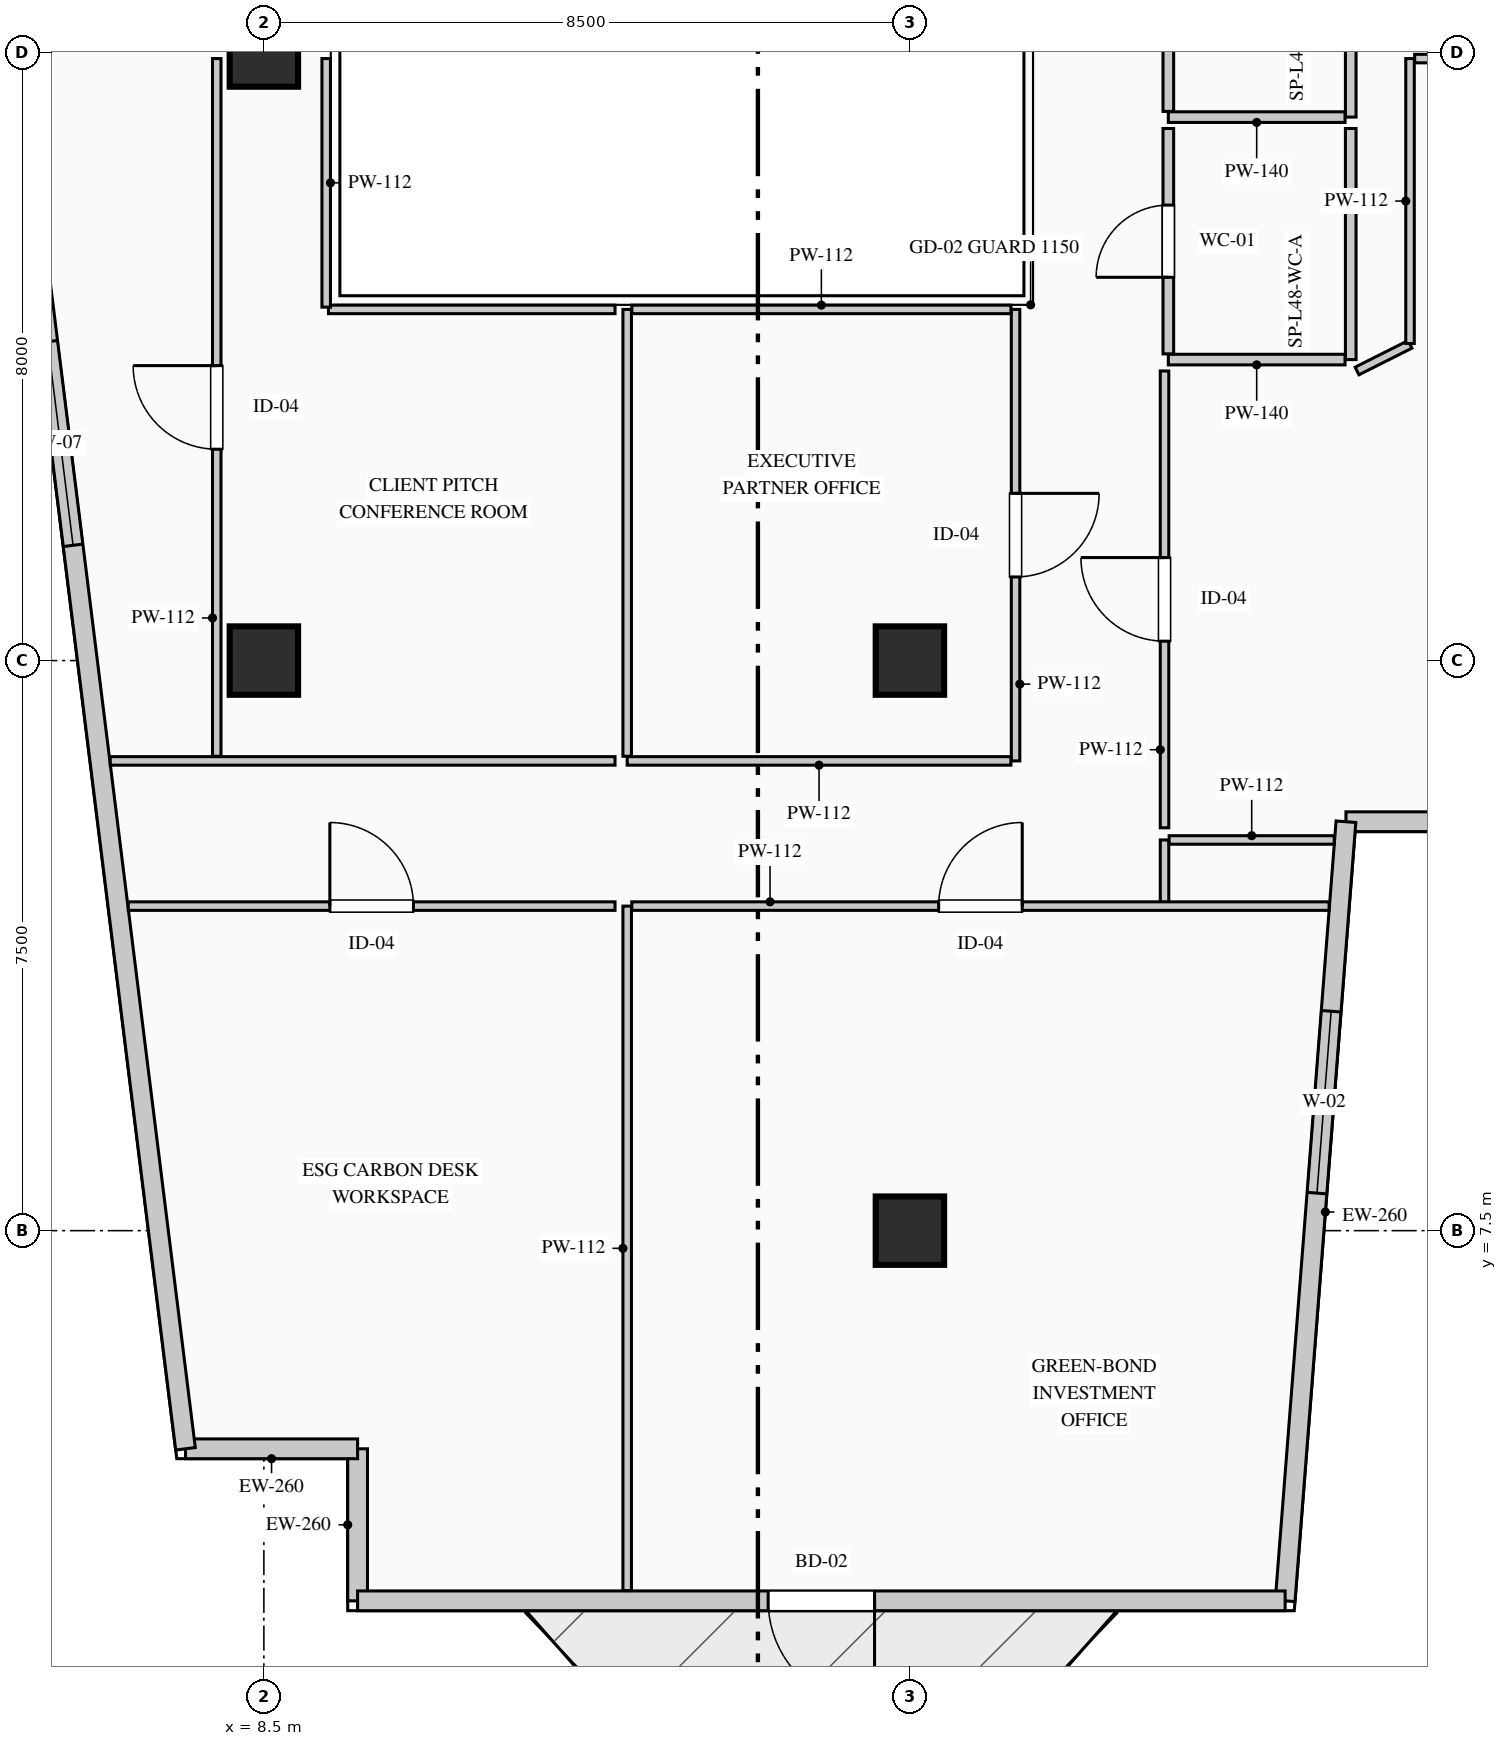
"""IFC4 building model, lengths in metres.
Left out: names, types, materials, properties, quantities, classifications, styles, units other than length and angle.
Written with IfcOpenShell. Run it as: python <this file> out.ifc"""

import sys

from ifc_helpers import new_model, si_unit, direction, frame, frame_2d, origin, origin_2d, place, context, subcontext, project, spatial, rectangle, extrude, element, fill, save


model = new_model("IFC4")
c1 = context("Model", 3, precision=1e-05, world=origin(), true_north=direction((0.0, 1.0)))
c2 = subcontext(c1, "Body", "Model", "MODEL_VIEW")
j1 = project(units=[si_unit("LENGTHUNIT", "METRE"), si_unit("PLANEANGLEUNIT", "RADIAN")], contexts=[c1])
p1 = place(None, origin())
s1 = spatial("IfcSite", under=j1, at=p1, CompositionType="ELEMENT")
p2 = place(p1, origin())
s2 = spatial("IfcBuilding", under=s1, at=p2, CompositionType="ELEMENT")
p3 = place(p2, frame((0.0, 0.0, 203.5)))
s3 = spatial("IfcBuildingStorey", under=s2, at=p3, CompositionType="ELEMENT", Elevation=203.5)
for number, where, z_axis, x_axis in (
    (1, (8.5, 15.0, 0.0), (0.0, 0.0, 1.0), (1.0, 0.0, 0.0)),
    (2, (8.5, 23.0, 0.0), (0.0, 0.0, 1.0), (1.0, 0.0, 0.0)),
    (3, (17.0, 7.5, 0.0), (0.0, 0.0, 1.0), (1.0, 0.0, 0.0)),
    (4, (17.0, 15.0, 0.0), (0.0, 0.0, 1.0), (1.0, 0.0, 0.0)),
):
    element("IfcColumn", number, at=place(p3, frame(where, z_axis=z_axis, x_axis=x_axis)), inside=s3, PredefinedType="COLUMN", context=c2, shape_type="SweptSolid", body=[
        extrude(rectangle(XDim=0.9, YDim=0.9, at=origin_2d()), origin(), (0.0, 0.0, 1.0), 3.95),
    ])
p4 = place(p3, frame((9.733, 2.63, 0.0), z_axis=(0.0, 0.0, 1.0), x_axis=(0.0, 1.0, 0.0)))
e5 = element("IfcWall", 5, at=p4, inside=s3, PredefinedType="STANDARD", context=c2, shape_type="SweptSolid", body=[
    extrude(rectangle(XDim=2.0, YDim=0.26, at=frame_2d((1.0, 0.0))), origin(), (0.0, 0.0, 1.0), 3.7),
])
p5 = place(p3, frame((9.733, 4.63, 0.0), z_axis=(0.0, 0.0, 1.0), x_axis=(-1.0, 0.0, 0.0)))
e6 = element("IfcWall", 6, at=p5, inside=s3, PredefinedType="STANDARD", context=c2, shape_type="SweptSolid", body=[
    extrude(rectangle(XDim=2.264, YDim=0.26, at=frame_2d((1.132, 0.0))), origin(), (0.0, 0.0, 1.0), 3.7),
])
p6 = place(p3, frame((7.469, 4.63, 0.0), z_axis=(0.0, 0.0, 1.0), x_axis=(-0.123515300309, 0.992342667928, 0.0)))
e7 = element("IfcWall", 7, at=p6, inside=s3, PredefinedType="STANDARD", context=c2, shape_type="SweptSolid", body=[
    extrude(rectangle(XDim=37.024, YDim=0.26, at=frame_2d((18.512, 0.0))), origin(), (0.0, 0.0, 1.0), 3.7),
])
p7 = place(p6, frame((11.978, 0.0, 0.9)))
e8 = element("IfcOpeningElement", 8, at=p7, cuts=e7, PredefinedType="OPENING", context=c2, shape_type="SweptSolid", body=[
    extrude(rectangle(XDim=2.7, YDim=2.1, at=frame_2d((1.35, 1.05))), frame((0.0, 0.14, 0.0), z_axis=(0.0, -1.0, 0.0), x_axis=(1.0, 0.0, 0.0)), (0.0, 0.0, 1.0), 0.28),
])
p8 = place(p3, frame((29.59, 12.88, 0.0), z_axis=(0.0, 0.0, 1.0), x_axis=(-1.0, 0.0, 0.0)))
e9 = element("IfcWall", 9, at=p8, inside=s3, PredefinedType="STANDARD", context=c2, shape_type="SweptSolid", body=[
    extrude(rectangle(XDim=6.853, YDim=0.26, at=frame_2d((3.426, 0.0))), origin(), (0.0, 0.0, 1.0), 3.7),
])
p9 = place(p8, frame((1.267, 0.0, 0.9)))
e10 = element("IfcOpeningElement", 10, at=p9, cuts=e9, PredefinedType="OPENING", context=c2, shape_type="SweptSolid", body=[
    extrude(rectangle(XDim=2.4, YDim=2.1, at=frame_2d((1.2, 1.05))), frame((0.0, 0.14, 0.0), z_axis=(0.0, -1.0, 0.0), x_axis=(1.0, 0.0, 0.0)), (0.0, 0.0, 1.0), 0.28),
])
p10 = place(p3, frame((22.737, 12.88, 0.0), z_axis=(0.0, 0.0, 1.0), x_axis=(-0.077816860153, -0.996967670627, 0.0)))
e11 = element("IfcWall", 11, at=p10, inside=s3, PredefinedType="STANDARD", context=c2, shape_type="SweptSolid", body=[
    extrude(rectangle(XDim=10.281, YDim=0.26, at=frame_2d((5.141, 0.0))), origin(), (0.0, 0.0, 1.0), 3.7),
])
p11 = place(p10, frame((2.501, 0.0, 0.9)))
e12 = element("IfcOpeningElement", 12, at=p11, cuts=e11, PredefinedType="OPENING", context=c2, shape_type="SweptSolid", body=[
    extrude(rectangle(XDim=2.4, YDim=2.1, at=frame_2d((1.2, 1.05))), frame((0.0, 0.14, 0.0), z_axis=(0.0, -1.0, 0.0), x_axis=(1.0, 0.0, 0.0)), (0.0, 0.0, 1.0), 0.28),
])
p12 = place(p3, frame((21.937, 2.63, 0.0), z_axis=(0.0, 0.0, 1.0), x_axis=(-1.0, 0.0, 0.0)))
e13 = element("IfcWall", 13, at=p12, inside=s3, PredefinedType="STANDARD", context=c2, shape_type="SweptSolid", body=[
    extrude(rectangle(XDim=12.204, YDim=0.26, at=frame_2d((6.102, 0.0))), origin(), (0.0, 0.0, 1.0), 3.7),
])
p13 = place(p12, frame((5.402, 0.0, 0.0)))
e14 = element("IfcOpeningElement", 14, at=p13, cuts=e13, PredefinedType="OPENING", context=c2, shape_type="SweptSolid", body=[
    extrude(rectangle(XDim=1.4, YDim=2.2, at=frame_2d((0.7, 1.1))), frame((0.0, 0.14, 0.0), z_axis=(0.0, -1.0, 0.0), x_axis=(1.0, 0.0, 0.0)), (0.0, 0.0, 1.0), 0.28),
])
p14 = place(p3, frame((22.8, 25.15, 0.0), z_axis=(0.0, 0.0, 1.0), x_axis=(0.0, -1.0, 0.0)))
e15 = element("IfcWall", 15, at=p14, inside=s3, PredefinedType="PARTITIONING", context=c2, shape_type="SweptSolid", body=[
    extrude(rectangle(XDim=3.0, YDim=0.14, at=frame_2d((1.5, 0.0))), origin(), (0.0, 0.0, 1.0), 3.285),
])
p15 = place(p3, frame((22.725, 22.15, 0.0), z_axis=(0.0, 0.0, 1.0), x_axis=(-1.0, 0.0, 0.0)))
e16 = element("IfcWall", 16, at=p15, inside=s3, PredefinedType="PARTITIONING", context=c2, shape_type="SweptSolid", body=[
    extrude(rectangle(XDim=2.325, YDim=0.14, at=frame_2d((1.163, 0.0))), origin(), (0.0, 0.0, 1.0), 3.7),
])
p16 = place(p3, frame((20.4, 22.225, 0.0), z_axis=(0.0, 0.0, 1.0), x_axis=(0.0, 1.0, 0.0)))
e17 = element("IfcWall", 17, at=p16, inside=s3, PredefinedType="PARTITIONING", context=c2, shape_type="SweptSolid", body=[
    extrude(rectangle(XDim=2.925, YDim=0.14, at=frame_2d((1.462, 0.0))), origin(), (0.0, 0.0, 1.0), 3.7),
])
p17 = place(p16, frame((0.988, 0.0, 0.0)))
e18 = element("IfcOpeningElement", 18, at=p17, cuts=e17, PredefinedType="OPENING", context=c2, shape_type="SweptSolid", body=[
    extrude(rectangle(XDim=0.95, YDim=2.15, at=frame_2d((0.475, 1.075))), frame((0.0, 0.08, 0.0), z_axis=(0.0, -1.0, 0.0), x_axis=(1.0, 0.0, 0.0)), (0.0, 0.0, 1.0), 0.16),
])
p18 = place(p3, frame((22.8, 22.0, 0.0), z_axis=(0.0, 0.0, 1.0), x_axis=(0.0, -1.0, 0.0)))
e19 = element("IfcWall", 19, at=p18, inside=s3, PredefinedType="PARTITIONING", context=c2, shape_type="SweptSolid", body=[
    extrude(rectangle(XDim=3.04, YDim=0.14, at=frame_2d((1.52, 0.0))), origin(), (0.0, 0.0, 1.0), 3.285),
])
p19 = place(p3, frame((22.725, 18.96, 0.0), z_axis=(0.0, 0.0, 1.0), x_axis=(-1.0, 0.0, 0.0)))
e20 = element("IfcWall", 20, at=p19, inside=s3, PredefinedType="PARTITIONING", context=c2, shape_type="SweptSolid", body=[
    extrude(rectangle(XDim=2.325, YDim=0.14, at=frame_2d((1.163, 0.0))), origin(), (0.0, 0.0, 1.0), 3.7),
])
p20 = place(p3, frame((20.4, 19.035, 0.0), z_axis=(0.0, 0.0, 1.0), x_axis=(0.0, 1.0, 0.0)))
e21 = element("IfcWall", 21, at=p20, inside=s3, PredefinedType="PARTITIONING", context=c2, shape_type="SweptSolid", body=[
    extrude(rectangle(XDim=2.965, YDim=0.14, at=frame_2d((1.482, 0.0))), origin(), (0.0, 0.0, 1.0), 3.7),
])
p21 = place(p20, frame((1.008, 0.0, 0.0)))
e22 = element("IfcOpeningElement", 22, at=p21, cuts=e21, PredefinedType="OPENING", context=c2, shape_type="SweptSolid", body=[
    extrude(rectangle(XDim=0.95, YDim=2.15, at=frame_2d((0.475, 1.075))), frame((0.0, 0.08, 0.0), z_axis=(0.0, -1.0, 0.0), x_axis=(1.0, 0.0, 0.0)), (0.0, 0.0, 1.0), 0.16),
])
p22 = place(p3, frame((20.35, 11.8, 0.0), z_axis=(0.0, 0.0, 1.0), x_axis=(0.0, 1.0, 0.0)))
e23 = element("IfcWall", 23, at=p22, inside=s3, PredefinedType="PARTITIONING", context=c2, shape_type="SweptSolid", body=[
    extrude(rectangle(XDim=0.84, YDim=0.112, at=frame_2d((0.42, 0.0))), origin(), (0.0, 0.0, 1.0), 3.7),
])
p23 = place(p3, frame((20.411, 12.64, 0.0), z_axis=(0.0, 0.0, 1.0), x_axis=(1.0, 0.0, 0.0)))
e24 = element("IfcWall", 24, at=p23, inside=s3, PredefinedType="PARTITIONING", context=c2, shape_type="SweptSolid", body=[
    extrude(rectangle(XDim=2.172, YDim=0.112, at=frame_2d((1.086, 0.0))), origin(), (0.0, 0.0, 1.0), 3.7),
])
p24 = place(p3, frame((13.28, 2.765, 0.0), z_axis=(0.0, 0.0, 1.0), x_axis=(0.0, 1.0, 0.0)))
e25 = element("IfcWall", 25, at=p24, inside=s3, PredefinedType="PARTITIONING", context=c2, shape_type="SweptSolid", body=[
    extrude(rectangle(XDim=9.005, YDim=0.112, at=frame_2d((4.502, 0.0))), origin(), (0.0, 0.0, 1.0), 3.7),
])
p25 = place(p3, frame((13.341, 11.77, 0.0), z_axis=(0.0, 0.0, 1.0), x_axis=(1.0, 0.0, 0.0)))
e26 = element("IfcWall", 26, at=p25, inside=s3, PredefinedType="PARTITIONING", context=c2, shape_type="SweptSolid", body=[
    extrude(rectangle(XDim=9.174, YDim=0.112, at=frame_2d((4.587, 0.0))), origin(), (0.0, 0.0, 1.0), 3.7),
])
p26 = place(p25, frame((4.037, 0.0, 0.0)))
e27 = element("IfcOpeningElement", 27, at=p26, cuts=e26, PredefinedType="OPENING", context=c2, shape_type="SweptSolid", body=[
    extrude(rectangle(XDim=1.1, YDim=2.2, at=frame_2d((0.55, 1.1))), frame((0.0, 0.066, 0.0), z_axis=(0.0, -1.0, 0.0), x_axis=(1.0, 0.0, 0.0)), (0.0, 0.0, 1.0), 0.132),
])
p27 = place(p3, frame((6.716, 11.77, 0.0), z_axis=(0.0, 0.0, 1.0), x_axis=(1.0, 0.0, 0.0)))
e28 = element("IfcWall", 28, at=p27, inside=s3, PredefinedType="PARTITIONING", context=c2, shape_type="SweptSolid", body=[
    extrude(rectangle(XDim=6.404, YDim=0.112, at=frame_2d((3.202, 0.0))), origin(), (0.0, 0.0, 1.0), 3.7),
])
p28 = place(p27, frame((2.652, 0.0, 0.0)))
e29 = element("IfcOpeningElement", 29, at=p28, cuts=e28, PredefinedType="OPENING", context=c2, shape_type="SweptSolid", body=[
    extrude(rectangle(XDim=1.1, YDim=2.2, at=frame_2d((0.55, 1.1))), frame((0.0, 0.066, 0.0), z_axis=(0.0, -1.0, 0.0), x_axis=(1.0, 0.0, 0.0)), (0.0, 0.0, 1.0), 0.132),
])
p29 = place(p3, frame((20.35, 12.8, 0.0), z_axis=(0.0, 0.0, 1.0), x_axis=(0.0, 1.0, 0.0)))
e30 = element("IfcWall", 30, at=p29, inside=s3, PredefinedType="PARTITIONING", context=c2, shape_type="SweptSolid", body=[
    extrude(rectangle(XDim=6.01, YDim=0.112, at=frame_2d((3.005, 0.0))), origin(), (0.0, 0.0, 1.0), 3.7),
])
p30 = place(p29, frame((2.455, 0.0, 0.0)))
e31 = element("IfcOpeningElement", 31, at=p30, cuts=e30, PredefinedType="OPENING", context=c2, shape_type="SweptSolid", body=[
    extrude(rectangle(XDim=1.1, YDim=2.2, at=frame_2d((0.55, 1.1))), frame((0.0, 0.066, 0.0), z_axis=(0.0, -1.0, 0.0), x_axis=(1.0, 0.0, 0.0)), (0.0, 0.0, 1.0), 0.132),
])
p31 = place(p3, frame((22.883, 18.81, 0.0), z_axis=(0.0, 0.0, 1.0), x_axis=(0.893737436086, 0.448590453909, 0.0)))
e32 = element("IfcWall", 32, at=p31, inside=s3, PredefinedType="PARTITIONING", context=c2, shape_type="SweptSolid", body=[
    extrude(rectangle(XDim=0.78, YDim=0.112, at=frame_2d((0.39, 0.0))), origin(), (0.0, 0.0, 1.0), 3.7),
])
p32 = place(p3, frame((23.58, 19.171, 0.0), z_axis=(0.0, 0.0, 1.0), x_axis=(0.0, 1.0, 0.0)))
e33 = element("IfcWall", 33, at=p32, inside=s3, PredefinedType="PARTITIONING", context=c2, shape_type="SweptSolid", body=[
    extrude(rectangle(XDim=3.749, YDim=0.112, at=frame_2d((1.875, 0.0))), origin(), (0.0, 0.0, 1.0), 3.7),
])
p33 = place(p3, frame((23.641, 22.92, 0.0), z_axis=(0.0, 0.0, 1.0), x_axis=(1.0, 0.0, 0.0)))
e34 = element("IfcWall", 34, at=p33, inside=s3, PredefinedType="PARTITIONING", context=c2, shape_type="SweptSolid", body=[
    extrude(rectangle(XDim=2.348, YDim=0.112, at=frame_2d((1.174, 0.0))), origin(), (0.0, 0.0, 1.0), 3.7),
])
p34 = place(p3, frame((18.39, 19.62, 0.0), z_axis=(0.0, 0.0, 1.0), x_axis=(0.0, -1.0, 0.0)))
e35 = element("IfcWall", 35, at=p34, inside=s3, PredefinedType="PARTITIONING", context=c2, shape_type="SweptSolid", body=[
    extrude(rectangle(XDim=5.94, YDim=0.112, at=frame_2d((2.97, 0.0))), origin(), (0.0, 0.0, 1.0), 3.7),
])
p35 = place(p34, frame((2.42, 0.0, 0.0)))
e36 = element("IfcOpeningElement", 36, at=p35, cuts=e35, PredefinedType="OPENING", context=c2, shape_type="SweptSolid", body=[
    extrude(rectangle(XDim=1.1, YDim=2.2, at=frame_2d((0.55, 1.1))), frame((0.0, 0.066, 0.0), z_axis=(0.0, -1.0, 0.0), x_axis=(1.0, 0.0, 0.0)), (0.0, 0.0, 1.0), 0.132),
])
p36 = place(p3, frame((18.329, 13.68, 0.0), z_axis=(0.0, 0.0, 1.0), x_axis=(-1.0, 0.0, 0.0)))
e37 = element("IfcWall", 37, at=p36, inside=s3, PredefinedType="PARTITIONING", context=c2, shape_type="SweptSolid", body=[
    extrude(rectangle(XDim=5.049, YDim=0.112, at=frame_2d((2.524, 0.0))), origin(), (0.0, 0.0, 1.0), 3.7),
])
p37 = place(p3, frame((13.28, 13.741, 0.0), z_axis=(0.0, 0.0, 1.0), x_axis=(0.0, 1.0, 0.0)))
e38 = element("IfcWall", 38, at=p37, inside=s3, PredefinedType="PARTITIONING", context=c2, shape_type="SweptSolid", body=[
    extrude(rectangle(XDim=5.879, YDim=0.112, at=frame_2d((2.939, 0.0))), origin(), (0.0, 0.0, 1.0), 3.7),
])
p38 = place(p3, frame((13.341, 19.62, 0.0), z_axis=(0.0, 0.0, 1.0), x_axis=(1.0, 0.0, 0.0)))
e39 = element("IfcWall", 39, at=p38, inside=s3, PredefinedType="PARTITIONING", context=c2, shape_type="SweptSolid", body=[
    extrude(rectangle(XDim=4.988, YDim=0.112, at=frame_2d((2.494, 0.0))), origin(), (0.0, 0.0, 1.0), 3.7),
])
p39 = place(p3, frame((9.35, 19.62, 0.0), z_axis=(0.0, 0.0, 1.0), x_axis=(1.0, 0.0, 0.0)))
e40 = element("IfcWall", 40, at=p39, inside=s3, PredefinedType="PARTITIONING", context=c2, shape_type="SweptSolid", body=[
    extrude(rectangle(XDim=3.77, YDim=0.112, at=frame_2d((1.885, 0.0))), origin(), (0.0, 0.0, 1.0), 3.7),
])
p40 = place(p3, frame((13.12, 13.68, 0.0), z_axis=(0.0, 0.0, 1.0), x_axis=(-1.0, 0.0, 0.0)))
e41 = element("IfcWall", 41, at=p40, inside=s3, PredefinedType="PARTITIONING", context=c2, shape_type="SweptSolid", body=[
    extrude(rectangle(XDim=6.642, YDim=0.112, at=frame_2d((3.321, 0.0))), origin(), (0.0, 0.0, 1.0), 3.7),
])
p41 = place(p3, frame((7.88, 13.741, 0.0), z_axis=(0.0, 0.0, 1.0), x_axis=(0.0, 1.0, 0.0)))
e42 = element("IfcWall", 42, at=p41, inside=s3, PredefinedType="PARTITIONING", context=c2, shape_type="SweptSolid", body=[
    extrude(rectangle(XDim=9.179, YDim=0.112, at=frame_2d((4.589, 0.0))), origin(), (0.0, 0.0, 1.0), 3.7),
])
p42 = place(p41, frame((4.04, 0.0, 0.0)))
e43 = element("IfcOpeningElement", 43, at=p42, cuts=e42, PredefinedType="OPENING", context=c2, shape_type="SweptSolid", body=[
    extrude(rectangle(XDim=1.1, YDim=2.2, at=frame_2d((0.55, 1.1))), frame((0.0, 0.066, 0.0), z_axis=(0.0, -1.0, 0.0), x_axis=(1.0, 0.0, 0.0)), (0.0, 0.0, 1.0), 0.132),
])
p43 = place(p3, frame((9.32, 22.92, 0.0), z_axis=(0.0, 0.0, 1.0), x_axis=(0.0, -1.0, 0.0)))
e44 = element("IfcWall", 44, at=p43, inside=s3, PredefinedType="PARTITIONING", context=c2, shape_type="SweptSolid", body=[
    extrude(rectangle(XDim=3.27, YDim=0.112, at=frame_2d((1.635, 0.0))), origin(), (0.0, 0.0, 1.0), 3.485),
])
p44 = place(p7, origin())
e45 = element("IfcWindow", 45, at=p44, inside=s3, PartitioningType="DOUBLE_PANEL_VERTICAL", PredefinedType="WINDOW", context=c2, shape_type="SweptSolid", body=[
    extrude(rectangle(XDim=2.7, YDim=2.1, at=frame_2d((1.35, 1.05))), frame((0.0, 0.03, 0.0), z_axis=(0.0, -1.0, 0.0), x_axis=(1.0, 0.0, 0.0)), (0.0, 0.0, 1.0), 0.06),
])
fill(e8, e45)
p45 = place(p11, origin())
e46 = element("IfcWindow", 46, at=p45, inside=s3, PartitioningType="DOUBLE_PANEL_VERTICAL", PredefinedType="WINDOW", context=c2, shape_type="SweptSolid", body=[
    extrude(rectangle(XDim=2.4, YDim=2.1, at=frame_2d((1.2, 1.05))), frame((0.0, 0.03, 0.0), z_axis=(0.0, -1.0, 0.0), x_axis=(1.0, 0.0, 0.0)), (0.0, 0.0, 1.0), 0.06),
])
fill(e12, e46)
p46 = place(p13, origin())
e47 = element("IfcDoor", 47, at=p46, inside=s3, OperationType="SINGLE_SWING_LEFT", PredefinedType="DOOR", context=c2, shape_type="SweptSolid", body=[
    extrude(rectangle(XDim=1.4, YDim=2.2, at=frame_2d((0.7, 1.1))), frame((0.0, 0.025, 0.0), z_axis=(0.0, -1.0, 0.0), x_axis=(1.0, 0.0, 0.0)), (0.0, 0.0, 1.0), 0.05),
])
fill(e14, e47)
p47 = place(p21, origin())
e48 = element("IfcDoor", 48, at=p47, inside=s3, OperationType="SINGLE_SWING_LEFT", PredefinedType="DOOR", context=c2, shape_type="SweptSolid", body=[
    extrude(rectangle(XDim=0.95, YDim=2.15, at=frame_2d((0.475, 1.075))), frame((0.0, 0.025, 0.0), z_axis=(0.0, -1.0, 0.0), x_axis=(1.0, 0.0, 0.0)), (0.0, 0.0, 1.0), 0.05),
])
fill(e22, e48)
p48 = place(p26, origin())
e49 = element("IfcDoor", 49, at=p48, inside=s3, OperationType="SINGLE_SWING_RIGHT", PredefinedType="DOOR", context=c2, shape_type="SweptSolid", body=[
    extrude(rectangle(XDim=1.1, YDim=2.2, at=frame_2d((0.55, 1.1))), frame((0.0, 0.025, 0.0), z_axis=(0.0, -1.0, 0.0), x_axis=(1.0, 0.0, 0.0)), (0.0, 0.0, 1.0), 0.05),
])
fill(e27, e49)
p49 = place(p28, origin())
e50 = element("IfcDoor", 50, at=p49, inside=s3, OperationType="SINGLE_SWING_LEFT", PredefinedType="DOOR", context=c2, shape_type="SweptSolid", body=[
    extrude(rectangle(XDim=1.1, YDim=2.2, at=frame_2d((0.55, 1.1))), frame((0.0, 0.025, 0.0), z_axis=(0.0, -1.0, 0.0), x_axis=(1.0, 0.0, 0.0)), (0.0, 0.0, 1.0), 0.05),
])
fill(e29, e50)
p50 = place(p30, origin())
e51 = element("IfcDoor", 51, at=p50, inside=s3, OperationType="SINGLE_SWING_RIGHT", PredefinedType="DOOR", context=c2, shape_type="SweptSolid", body=[
    extrude(rectangle(XDim=1.1, YDim=2.2, at=frame_2d((0.55, 1.1))), frame((0.0, 0.025, 0.0), z_axis=(0.0, -1.0, 0.0), x_axis=(1.0, 0.0, 0.0)), (0.0, 0.0, 1.0), 0.05),
])
fill(e31, e51)
p51 = place(p35, origin())
e52 = element("IfcDoor", 52, at=p51, inside=s3, OperationType="SINGLE_SWING_LEFT", PredefinedType="DOOR", context=c2, shape_type="SweptSolid", body=[
    extrude(rectangle(XDim=1.1, YDim=2.2, at=frame_2d((0.55, 1.1))), frame((0.0, 0.025, 0.0), z_axis=(0.0, -1.0, 0.0), x_axis=(1.0, 0.0, 0.0)), (0.0, 0.0, 1.0), 0.05),
])
fill(e36, e52)
p52 = place(p42, origin())
e53 = element("IfcDoor", 53, at=p52, inside=s3, OperationType="SINGLE_SWING_RIGHT", PredefinedType="DOOR", context=c2, shape_type="SweptSolid", body=[
    extrude(rectangle(XDim=1.1, YDim=2.2, at=frame_2d((0.55, 1.1))), frame((0.0, 0.025, 0.0), z_axis=(0.0, -1.0, 0.0), x_axis=(1.0, 0.0, 0.0)), (0.0, 0.0, 1.0), 0.05),
])
fill(e43, e53)
save(model, sys.argv[1])
